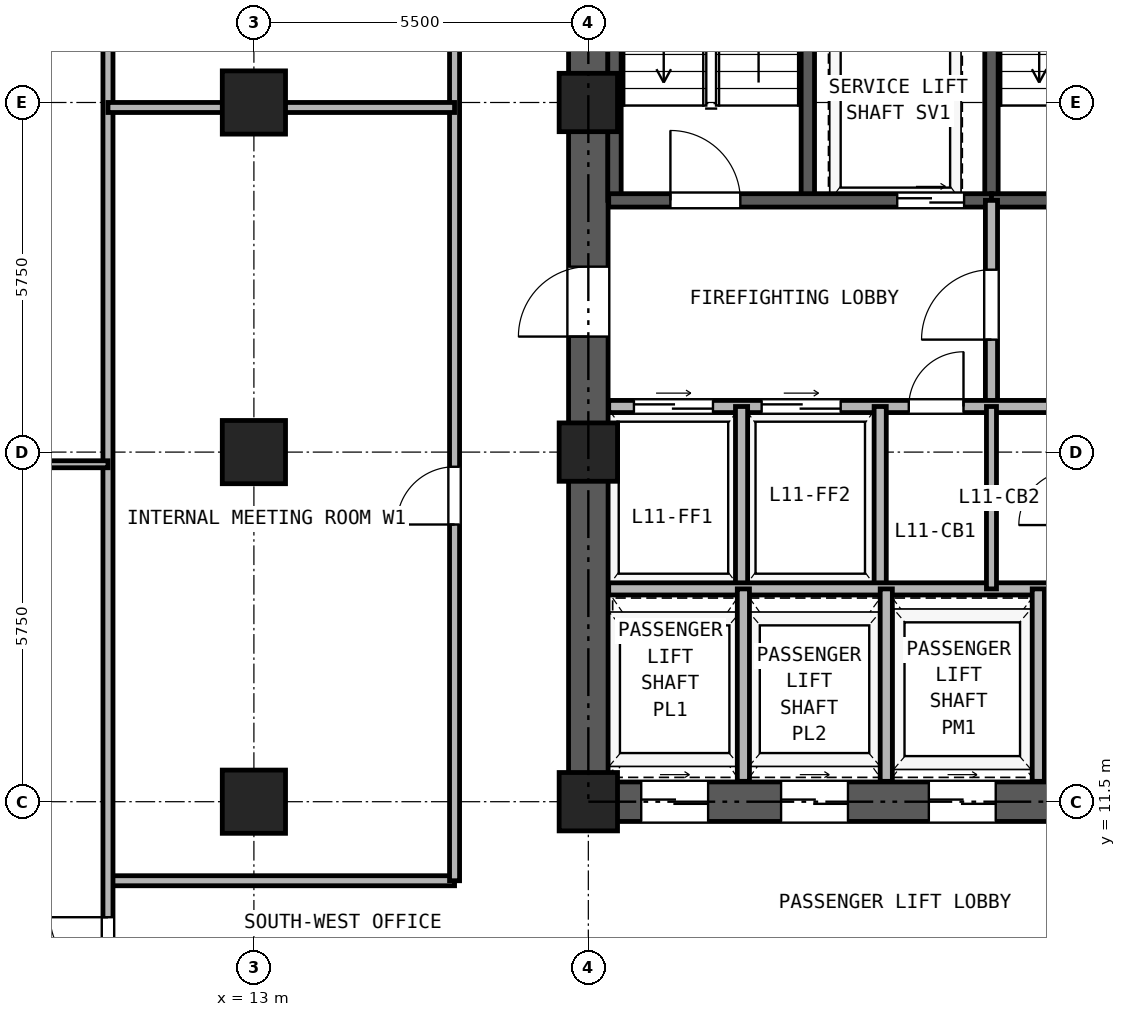
"""IFC4 building model, lengths in metres.
Left out: names, types, materials, properties, quantities, classifications, styles, units other than length and angle.
Written with IfcOpenShell. Run it as: python <this file> out.ifc"""

import sys

from ifc_helpers import new_model, si_unit, direction, frame, frame_2d, origin, origin_2d, place, context, subcontext, project, spatial, rectangle, hollow_rectangle, extrude, source, transform, mapped, element, fill, save


model = new_model("IFC4")
c1 = context("Model", 3, precision=1e-05, world=origin(), true_north=direction((0.0, 1.0)))
c2 = subcontext(c1, "Body", "Model", "MODEL_VIEW")
j1 = project(units=[si_unit("LENGTHUNIT", "METRE"), si_unit("PLANEANGLEUNIT", "RADIAN")], contexts=[c1])
p1 = place(None, origin())
s1 = spatial("IfcSite", under=j1, at=p1, CompositionType="ELEMENT")
p2 = place(p1, origin())
s2 = spatial("IfcBuilding", under=s1, at=p2, CompositionType="ELEMENT")
p3 = place(p2, frame((0.0, 0.0, 44.1)))
s3 = spatial("IfcBuildingStorey", under=s2, at=p3, CompositionType="ELEMENT", Elevation=44.1)
m1 = source(origin(), c2, "Body", "SweptSolid", [
    extrude(hollow_rectangle(XDim=1.04, YDim=1.04, WallThickness=0.065, at=origin_2d()), origin(), (0.0, 0.0, 1.0), 3.32),
])
for number, where, z_axis, x_axis in (
    (1, (13.0, 11.5, 0.0), (0.0, 0.0, 1.0), (1.0, 0.0, 0.0)),
    (2, (13.0, 17.25, 0.0), (0.0, 0.0, 1.0), (1.0, 0.0, 0.0)),
    (3, (13.0, 23.0, 0.0), (0.0, 0.0, 1.0), (1.0, 0.0, 0.0)),
):
    element("IfcColumn", number, at=place(p3, frame(where, z_axis=z_axis, x_axis=x_axis)), inside=s3, PredefinedType="COLUMN", context=c2, shape_type="MappedRepresentation", body=[
        mapped(m1, transform((0.0, 0.0, 0.0), x_axis=(1.0, 0.0, 0.0), y_axis=(0.0, 1.0, 0.0), z_axis=(0.0, 0.0, 1.0), scale=1.0)),
    ])
m2 = source(origin(), c2, "Body", "SweptSolid", [
    extrude(hollow_rectangle(XDim=0.96, YDim=0.96, WallThickness=0.06, at=origin_2d()), origin(), (0.0, 0.0, 1.0), 3.32),
])
for number, where, z_axis, x_axis in (
    (4, (18.5, 11.5, 0.0), (0.0, 0.0, 1.0), (1.0, 0.0, 0.0)),
    (5, (18.5, 17.25, 0.0), (0.0, 0.0, 1.0), (1.0, 0.0, 0.0)),
    (6, (18.5, 23.0, 0.0), (0.0, 0.0, 1.0), (1.0, 0.0, 0.0)),
):
    element("IfcColumn", number, at=place(p3, frame(where, z_axis=z_axis, x_axis=x_axis)), inside=s3, PredefinedType="COLUMN", context=c2, shape_type="MappedRepresentation", body=[
        mapped(m2, transform((0.0, 0.0, 0.0), x_axis=(1.0, 0.0, 0.0), y_axis=(0.0, 1.0, 0.0), z_axis=(0.0, 0.0, 1.0), scale=1.0)),
    ])
p4 = place(p3, frame((18.175, 11.5, 0.0), z_axis=(0.0, 0.0, 1.0), x_axis=(1.0, 0.0, 0.0)))
e7 = element("IfcWall", 7, at=p4, inside=s3, PredefinedType="SHEAR", context=c2, shape_type="SweptSolid", body=[
    extrude(rectangle(XDim=10.65, YDim=0.65, at=frame_2d((5.325, 0.0))), origin(), (0.0, 0.0, 1.0), 3.32),
])
p5 = place(p4, frame((1.195, 0.0, 0.0)))
e8 = element("IfcOpeningElement", 8, at=p5, cuts=e7, PredefinedType="OPENING", context=c2, shape_type="SweptSolid", body=[
    extrude(rectangle(XDim=1.1, YDim=2.25, at=frame_2d((0.55, 1.125))), frame((0.0, 0.335, 0.0), z_axis=(0.0, -1.0, 0.0), x_axis=(1.0, 0.0, 0.0)), (0.0, 0.0, 1.0), 0.67),
])
p6 = place(p4, frame((3.495, 0.0, 0.0)))
e9 = element("IfcOpeningElement", 9, at=p6, cuts=e7, PredefinedType="OPENING", context=c2, shape_type="SweptSolid", body=[
    extrude(rectangle(XDim=1.1, YDim=2.25, at=frame_2d((0.55, 1.125))), frame((0.0, 0.335, 0.0), z_axis=(0.0, -1.0, 0.0), x_axis=(1.0, 0.0, 0.0)), (0.0, 0.0, 1.0), 0.67),
])
p7 = place(p4, frame((5.925, 0.0, 0.0)))
e10 = element("IfcOpeningElement", 10, at=p7, cuts=e7, PredefinedType="OPENING", context=c2, shape_type="SweptSolid", body=[
    extrude(rectangle(XDim=1.1, YDim=2.25, at=frame_2d((0.55, 1.125))), frame((0.0, 0.335, 0.0), z_axis=(0.0, -1.0, 0.0), x_axis=(1.0, 0.0, 0.0)), (0.0, 0.0, 1.0), 0.67),
])
p8 = place(p4, frame((8.325, 0.0, 0.0)))
e11 = element("IfcOpeningElement", 11, at=p8, cuts=e7, PredefinedType="OPENING", context=c2, shape_type="SweptSolid", body=[
    extrude(rectangle(XDim=1.1, YDim=2.25, at=frame_2d((0.55, 1.125))), frame((0.0, 0.335, 0.0), z_axis=(0.0, -1.0, 0.0), x_axis=(1.0, 0.0, 0.0)), (0.0, 0.0, 1.0), 0.67),
])
p9 = place(p3, frame((18.5, 11.825, 0.0), z_axis=(0.0, 0.0, 1.0), x_axis=(0.0, 1.0, 0.0)))
e12 = element("IfcWall", 12, at=p9, inside=s3, PredefinedType="SHEAR", context=c2, shape_type="SweptSolid", body=[
    extrude(rectangle(XDim=16.6, YDim=0.65, at=frame_2d((8.3, 0.0))), origin(), (0.0, 0.0, 1.0), 3.32),
])
p10 = place(p9, frame((7.325, 0.0, 0.0)))
e13 = element("IfcOpeningElement", 13, at=p10, cuts=e12, PredefinedType="OPENING", context=c2, shape_type="SweptSolid", body=[
    extrude(rectangle(XDim=1.15, YDim=2.2, at=frame_2d((0.575, 1.1))), frame((0.0, 0.335, 0.0), z_axis=(0.0, -1.0, 0.0), x_axis=(1.0, 0.0, 0.0)), (0.0, 0.0, 1.0), 0.67),
])
for number, where, z_axis, x_axis in (
    (14, (18.93, 21.39, 0.0), (0.0, 0.0, 1.0), (0.0, 1.0, 0.0)),
    (15, (22.11, 21.39, 0.0), (0.0, 0.0, 1.0), (0.0, 1.0, 0.0)),
    (16, (25.13, 21.39, 0.0), (0.0, 0.0, 1.0), (0.0, 1.0, 0.0)),
):
    element("IfcWall", number, at=place(p3, frame(where, z_axis=z_axis, x_axis=x_axis)), inside=s3, PredefinedType="SOLIDWALL", context=c2, shape_type="SweptSolid", body=[
        extrude(rectangle(XDim=7.11, YDim=0.22, at=frame_2d((3.555, 0.0))), origin(), (0.0, 0.0, 1.0), 3.32),
    ])
p11 = place(p3, frame((18.835, 21.39, 0.0), z_axis=(0.0, 0.0, 1.0), x_axis=(1.0, 0.0, 0.0)))
e17 = element("IfcWall", 17, at=p11, inside=s3, PredefinedType="SOLIDWALL", context=c2, shape_type="SweptSolid", body=[
    extrude(rectangle(XDim=6.295, YDim=0.22, at=frame_2d((3.147, 0.0))), origin(), (0.0, 0.0, 1.0), 3.32),
])
p12 = place(p11, frame((1.015, 0.0, 0.0)))
e18 = element("IfcOpeningElement", 18, at=p12, cuts=e17, PredefinedType="OPENING", context=c2, shape_type="SweptSolid", body=[
    extrude(rectangle(XDim=1.15, YDim=2.2, at=frame_2d((0.575, 1.1))), frame((0.0, 0.12, 0.0), z_axis=(0.0, -1.0, 0.0), x_axis=(1.0, 0.0, 0.0)), (0.0, 0.0, 1.0), 0.24),
])
p13 = place(p11, frame((4.745, 0.0, 0.0)))
e19 = element("IfcOpeningElement", 19, at=p13, cuts=e17, PredefinedType="OPENING", context=c2, shape_type="SweptSolid", body=[
    extrude(rectangle(XDim=1.1, YDim=2.25, at=frame_2d((0.55, 1.125))), frame((0.0, 0.12, 0.0), z_axis=(0.0, -1.0, 0.0), x_axis=(1.0, 0.0, 0.0)), (0.0, 0.0, 1.0), 0.24),
])
p14 = place(p3, frame((25.13, 21.39, 0.0), z_axis=(0.0, 0.0, 1.0), x_axis=(1.0, 0.0, 0.0)))
e20 = element("IfcWall", 20, at=p14, inside=s3, PredefinedType="SOLIDWALL", context=c2, shape_type="SweptSolid", body=[
    extrude(rectangle(XDim=3.035, YDim=0.22, at=frame_2d((1.518, 0.0))), origin(), (0.0, 0.0, 1.0), 3.32),
])
p15 = place(p14, frame((0.92, 0.0, 0.0)))
e21 = element("IfcOpeningElement", 21, at=p15, cuts=e20, PredefinedType="OPENING", context=c2, shape_type="SweptSolid", body=[
    extrude(rectangle(XDim=1.15, YDim=2.2, at=frame_2d((0.575, 1.1))), frame((0.0, 0.12, 0.0), z_axis=(0.0, -1.0, 0.0), x_axis=(1.0, 0.0, 0.0)), (0.0, 0.0, 1.0), 0.24),
])
p16 = place(p3, frame((25.13, 18.0, 0.0), z_axis=(0.0, 0.0, 1.0), x_axis=(0.0, 1.0, 0.0)))
e22 = element("IfcWall", 22, at=p16, inside=s3, PredefinedType="PARTITIONING", context=c2, shape_type="SweptSolid", body=[
    extrude(rectangle(XDim=3.39, YDim=0.2, at=frame_2d((1.695, 0.0))), origin(), (0.0, 0.0, 1.0), 3.32),
])
p17 = place(p16, frame((1.1, 0.0, 0.0)))
e23 = element("IfcOpeningElement", 23, at=p17, cuts=e22, PredefinedType="OPENING", context=c2, shape_type="SweptSolid", body=[
    extrude(rectangle(XDim=1.15, YDim=2.2, at=frame_2d((0.575, 1.1))), frame((0.0, 0.11, 0.0), z_axis=(0.0, -1.0, 0.0), x_axis=(1.0, 0.0, 0.0)), (0.0, 0.0, 1.0), 0.22),
])
p18 = place(p3, frame((18.835, 18.0, 0.0), z_axis=(0.0, 0.0, 1.0), x_axis=(1.0, 0.0, 0.0)))
e24 = element("IfcWall", 24, at=p18, inside=s3, PredefinedType="PARTITIONING", context=c2, shape_type="SweptSolid", body=[
    extrude(rectangle(XDim=9.33, YDim=0.2, at=frame_2d((4.665, 0.0))), origin(), (0.0, 0.0, 1.0), 3.32),
])
p19 = place(p18, frame((0.415, 0.0, 0.0)))
e25 = element("IfcOpeningElement", 25, at=p19, cuts=e24, PredefinedType="OPENING", context=c2, shape_type="SweptSolid", body=[
    extrude(rectangle(XDim=1.3, YDim=2.3, at=frame_2d((0.65, 1.15))), frame((0.0, 0.11, 0.0), z_axis=(0.0, -1.0, 0.0), x_axis=(1.0, 0.0, 0.0)), (0.0, 0.0, 1.0), 0.22),
])
p20 = place(p18, frame((2.515, 0.0, 0.0)))
e26 = element("IfcOpeningElement", 26, at=p20, cuts=e24, PredefinedType="OPENING", context=c2, shape_type="SweptSolid", body=[
    extrude(rectangle(XDim=1.3, YDim=2.3, at=frame_2d((0.65, 1.15))), frame((0.0, 0.11, 0.0), z_axis=(0.0, -1.0, 0.0), x_axis=(1.0, 0.0, 0.0)), (0.0, 0.0, 1.0), 0.22),
])
p21 = place(p18, frame((4.935, 0.0, 0.0)))
e27 = element("IfcOpeningElement", 27, at=p21, cuts=e24, PredefinedType="OPENING", context=c2, shape_type="SweptSolid", body=[
    extrude(rectangle(XDim=0.9, YDim=2.05, at=frame_2d((0.45, 1.025))), frame((0.0, 0.11, 0.0), z_axis=(0.0, -1.0, 0.0), x_axis=(1.0, 0.0, 0.0)), (0.0, 0.0, 1.0), 0.22),
])
p22 = place(p18, frame((8.065, 0.0, 0.0)))
e28 = element("IfcOpeningElement", 28, at=p22, cuts=e24, PredefinedType="OPENING", context=c2, shape_type="SweptSolid", body=[
    extrude(rectangle(XDim=0.9, YDim=2.05, at=frame_2d((0.45, 1.025))), frame((0.0, 0.11, 0.0), z_axis=(0.0, -1.0, 0.0), x_axis=(1.0, 0.0, 0.0)), (0.0, 0.0, 1.0), 0.22),
])
for number, where, z_axis, x_axis in (
    (29, (21.02, 15.0, 0.0), (0.0, 0.0, 1.0), (0.0, 1.0, 0.0)),
    (30, (23.3, 15.0, 0.0), (0.0, 0.0, 1.0), (0.0, 1.0, 0.0)),
):
    element("IfcWall", number, at=place(p3, frame(where, z_axis=z_axis, x_axis=x_axis)), inside=s3, PredefinedType="PARTITIONING", context=c2, shape_type="SweptSolid", body=[
        extrude(rectangle(XDim=3.0, YDim=0.2, at=frame_2d((1.5, 0.0))), origin(), (0.0, 0.0, 1.0), 3.32),
    ])
p23 = place(p3, frame((18.835, 15.0, 0.0), z_axis=(0.0, 0.0, 1.0), x_axis=(1.0, 0.0, 0.0)))
e31 = element("IfcWall", 31, at=p23, inside=s3, PredefinedType="PARTITIONING", context=c2, shape_type="SweptSolid", body=[
    extrude(rectangle(XDim=9.33, YDim=0.2, at=frame_2d((4.665, 0.0))), origin(), (0.0, 0.0, 1.0), 3.32),
])
p24 = place(p3, frame((25.13, 15.0, 0.0), z_axis=(0.0, 0.0, 1.0), x_axis=(0.0, 1.0, 0.0)))
e32 = element("IfcWall", 32, at=p24, inside=s3, PredefinedType="PARTITIONING", context=c2, shape_type="SweptSolid", body=[
    extrude(rectangle(XDim=3.0, YDim=0.165, at=frame_2d((1.5, 0.0))), origin(), (0.0, 0.0, 1.0), 3.32),
])
for number, where, z_axis, x_axis in (
    (33, (21.05, 11.835, 0.0), (0.0, 0.0, 1.0), (0.0, 1.0, 0.0)),
    (34, (23.4, 11.835, 0.0), (0.0, 0.0, 1.0), (0.0, 1.0, 0.0)),
    (35, (25.9, 11.835, 0.0), (0.0, 0.0, 1.0), (0.0, 1.0, 0.0)),
):
    element("IfcWall", number, at=place(p3, frame(where, z_axis=z_axis, x_axis=x_axis)), inside=s3, PredefinedType="PARTITIONING", context=c2, shape_type="SweptSolid", body=[
        extrude(rectangle(XDim=3.165, YDim=0.2, at=frame_2d((1.583, 0.0))), origin(), (0.0, 0.0, 1.0), 3.32),
    ])
p25 = place(p3, frame((10.6, 10.2, 0.0), z_axis=(0.0, 0.0, 1.0), x_axis=(1.0, 0.0, 0.0)))
e36 = element("IfcWall", 36, at=p25, inside=s3, PredefinedType="PARTITIONING", context=c2, shape_type="SweptSolid", body=[
    extrude(rectangle(XDim=5.7, YDim=0.165, at=frame_2d((2.85, 0.0))), origin(), (0.0, 0.0, 1.0), 3.32),
])
p26 = place(p3, frame((16.3, 10.2, 0.0), z_axis=(0.0, 0.0, 1.0), x_axis=(0.0, 1.0, 0.0)))
e37 = element("IfcWall", 37, at=p26, inside=s3, PredefinedType="PARTITIONING", context=c2, shape_type="SweptSolid", body=[
    extrude(rectangle(XDim=19.7, YDim=0.165, at=frame_2d((9.85, 0.0))), origin(), (0.0, 0.0, 1.0), 3.32),
])
p27 = place(p26, frame((5.859, 0.0, 0.0)))
e38 = element("IfcOpeningElement", 38, at=p27, cuts=e37, PredefinedType="OPENING", context=c2, shape_type="SweptSolid", body=[
    extrude(rectangle(XDim=0.95, YDim=2.15, at=frame_2d((0.475, 1.075))), frame((0.0, 0.093, 0.0), z_axis=(0.0, -1.0, 0.0), x_axis=(1.0, 0.0, 0.0)), (0.0, 0.0, 1.0), 0.185),
])
p28 = place(p26, frame((15.709, 0.0, 0.0)))
e39 = element("IfcOpeningElement", 39, at=p28, cuts=e37, PredefinedType="OPENING", context=c2, shape_type="SweptSolid", body=[
    extrude(rectangle(XDim=0.95, YDim=2.15, at=frame_2d((0.475, 1.075))), frame((0.0, 0.093, 0.0), z_axis=(0.0, -1.0, 0.0), x_axis=(1.0, 0.0, 0.0)), (0.0, 0.0, 1.0), 0.185),
])
p29 = place(p3, frame((10.6, 0.16, 0.0), z_axis=(0.0, 0.0, 1.0), x_axis=(0.0, 1.0, 0.0)))
e40 = element("IfcWall", 40, at=p29, inside=s3, PredefinedType="PARTITIONING", context=c2, shape_type="SweptSolid", body=[
    extrude(rectangle(XDim=40.18, YDim=0.165, at=frame_2d((20.09, 0.0))), origin(), (0.0, 0.0, 1.0), 3.32),
])
p30 = place(p29, frame((8.49, 0.0, 0.0)))
e41 = element("IfcOpeningElement", 41, at=p30, cuts=e40, PredefinedType="OPENING", context=c2, shape_type="SweptSolid", body=[
    extrude(rectangle(XDim=0.95, YDim=2.15, at=frame_2d((0.475, 1.075))), frame((0.0, 0.093, 0.0), z_axis=(0.0, -1.0, 0.0), x_axis=(1.0, 0.0, 0.0)), (0.0, 0.0, 1.0), 0.185),
])
p31 = place(p29, frame((30.29, 0.0, 0.0)))
e42 = element("IfcOpeningElement", 42, at=p31, cuts=e40, PredefinedType="OPENING", context=c2, shape_type="SweptSolid", body=[
    extrude(rectangle(XDim=0.95, YDim=2.15, at=frame_2d((0.475, 1.075))), frame((0.0, 0.093, 0.0), z_axis=(0.0, -1.0, 0.0), x_axis=(1.0, 0.0, 0.0)), (0.0, 0.0, 1.0), 0.185),
])
p32 = place(p3, frame((0.16, 17.05, 0.0), z_axis=(0.0, 0.0, 1.0), x_axis=(1.0, 0.0, 0.0)))
e43 = element("IfcWall", 43, at=p32, inside=s3, PredefinedType="PARTITIONING", context=c2, shape_type="SweptSolid", body=[
    extrude(rectangle(XDim=10.44, YDim=0.115, at=frame_2d((5.22, 0.0))), origin(), (0.0, 0.0, 1.0), 2.539),
])
p33 = place(p3, frame((10.6, 22.918, 0.0), z_axis=(0.0, 0.0, 1.0), x_axis=(1.0, 0.0, 0.0)))
e44 = element("IfcWall", 44, at=p33, inside=s3, PredefinedType="PARTITIONING", context=c2, shape_type="SweptSolid", body=[
    extrude(rectangle(XDim=5.7, YDim=0.165, at=frame_2d((2.85, 0.0))), origin(), (0.0, 0.0, 1.0), 2.539),
])
p34 = place(p12, frame((1.15, 0.0, 0.0), z_axis=(0.0, 0.0, 1.0), x_axis=(-1.0, 0.0, 0.0)))
e45 = element("IfcDoor", 45, at=p34, inside=s3, OperationType="SINGLE_SWING_LEFT", PredefinedType="DOOR", context=c2, shape_type="SweptSolid", body=[
    extrude(rectangle(XDim=1.15, YDim=2.2, at=frame_2d((0.575, 1.1))), frame((0.0, 0.025, 0.0), z_axis=(0.0, -1.0, 0.0), x_axis=(1.0, 0.0, 0.0)), (0.0, 0.0, 1.0), 0.05),
])
fill(e18, e45)
p35 = place(p13, frame((1.1, 0.0, 0.0), z_axis=(0.0, 0.0, 1.0), x_axis=(-1.0, 0.0, 0.0)))
e46 = element("IfcDoor", 46, at=p35, inside=s3, OperationType="DOUBLE_DOOR_SLIDING", PredefinedType="DOOR", context=c2, shape_type="SweptSolid", body=[
    extrude(rectangle(XDim=1.1, YDim=2.25, at=frame_2d((0.55, 1.125))), frame((0.0, 0.025, 0.0), z_axis=(0.0, -1.0, 0.0), x_axis=(1.0, 0.0, 0.0)), (0.0, 0.0, 1.0), 0.05),
])
fill(e19, e46)
p36 = place(p17, origin())
e47 = element("IfcDoor", 47, at=p36, inside=s3, OperationType="SINGLE_SWING_LEFT", PredefinedType="DOOR", context=c2, shape_type="SweptSolid", body=[
    extrude(rectangle(XDim=1.15, YDim=2.2, at=frame_2d((0.575, 1.1))), frame((0.0, 0.025, 0.0), z_axis=(0.0, -1.0, 0.0), x_axis=(1.0, 0.0, 0.0)), (0.0, 0.0, 1.0), 0.05),
])
fill(e23, e47)
p37 = place(p19, origin())
e48 = element("IfcDoor", 48, at=p37, inside=s3, OperationType="DOUBLE_DOOR_SLIDING", PredefinedType="DOOR", context=c2, shape_type="SweptSolid", body=[
    extrude(rectangle(XDim=1.3, YDim=2.3, at=frame_2d((0.65, 1.15))), frame((0.0, 0.025, 0.0), z_axis=(0.0, -1.0, 0.0), x_axis=(1.0, 0.0, 0.0)), (0.0, 0.0, 1.0), 0.05),
])
fill(e25, e48)
p38 = place(p20, origin())
e49 = element("IfcDoor", 49, at=p38, inside=s3, OperationType="DOUBLE_DOOR_SLIDING", PredefinedType="DOOR", context=c2, shape_type="SweptSolid", body=[
    extrude(rectangle(XDim=1.3, YDim=2.3, at=frame_2d((0.65, 1.15))), frame((0.0, 0.025, 0.0), z_axis=(0.0, -1.0, 0.0), x_axis=(1.0, 0.0, 0.0)), (0.0, 0.0, 1.0), 0.05),
])
fill(e26, e49)
p39 = place(p21, frame((0.9, 0.0, 0.0), z_axis=(0.0, 0.0, 1.0), x_axis=(-1.0, 0.0, 0.0)))
e50 = element("IfcDoor", 50, at=p39, inside=s3, OperationType="SINGLE_SWING_RIGHT", PredefinedType="DOOR", context=c2, shape_type="SweptSolid", body=[
    extrude(rectangle(XDim=0.9, YDim=2.05, at=frame_2d((0.45, 1.025))), frame((0.0, 0.025, 0.0), z_axis=(0.0, -1.0, 0.0), x_axis=(1.0, 0.0, 0.0)), (0.0, 0.0, 1.0), 0.05),
])
fill(e27, e50)
p40 = place(p10, frame((1.15, 0.0, 0.0), z_axis=(0.0, 0.0, 1.0), x_axis=(-1.0, 0.0, 0.0)))
e51 = element("IfcDoor", 51, at=p40, inside=s3, OperationType="SINGLE_SWING_LEFT", PredefinedType="DOOR", context=c2, shape_type="SweptSolid", body=[
    extrude(rectangle(XDim=1.15, YDim=2.2, at=frame_2d((0.575, 1.1))), frame((0.0, 0.025, 0.0), z_axis=(0.0, -1.0, 0.0), x_axis=(1.0, 0.0, 0.0)), (0.0, 0.0, 1.0), 0.05),
])
fill(e13, e51)
p41 = place(p5, frame((1.1, 0.0, 0.0), z_axis=(0.0, 0.0, 1.0), x_axis=(-1.0, 0.0, 0.0)))
e52 = element("IfcDoor", 52, at=p41, inside=s3, OperationType="DOUBLE_DOOR_SLIDING", PredefinedType="DOOR", context=c2, shape_type="SweptSolid", body=[
    extrude(rectangle(XDim=1.1, YDim=2.25, at=frame_2d((0.55, 1.125))), frame((0.0, 0.025, 0.0), z_axis=(0.0, -1.0, 0.0), x_axis=(1.0, 0.0, 0.0)), (0.0, 0.0, 1.0), 0.05),
])
fill(e8, e52)
p42 = place(p6, frame((1.1, 0.0, 0.0), z_axis=(0.0, 0.0, 1.0), x_axis=(-1.0, 0.0, 0.0)))
e53 = element("IfcDoor", 53, at=p42, inside=s3, OperationType="DOUBLE_DOOR_SLIDING", PredefinedType="DOOR", context=c2, shape_type="SweptSolid", body=[
    extrude(rectangle(XDim=1.1, YDim=2.25, at=frame_2d((0.55, 1.125))), frame((0.0, 0.025, 0.0), z_axis=(0.0, -1.0, 0.0), x_axis=(1.0, 0.0, 0.0)), (0.0, 0.0, 1.0), 0.05),
])
fill(e9, e53)
p43 = place(p7, frame((1.1, 0.0, 0.0), z_axis=(0.0, 0.0, 1.0), x_axis=(-1.0, 0.0, 0.0)))
e54 = element("IfcDoor", 54, at=p43, inside=s3, OperationType="DOUBLE_DOOR_SLIDING", PredefinedType="DOOR", context=c2, shape_type="SweptSolid", body=[
    extrude(rectangle(XDim=1.1, YDim=2.25, at=frame_2d((0.55, 1.125))), frame((0.0, 0.025, 0.0), z_axis=(0.0, -1.0, 0.0), x_axis=(1.0, 0.0, 0.0)), (0.0, 0.0, 1.0), 0.05),
])
fill(e10, e54)
p44 = place(p30, frame((0.95, 0.0, 0.0), z_axis=(0.0, 0.0, 1.0), x_axis=(-1.0, 0.0, 0.0)))
e55 = element("IfcDoor", 55, at=p44, inside=s3, OperationType="SINGLE_SWING_RIGHT", PredefinedType="DOOR", context=c2, shape_type="SweptSolid", body=[
    extrude(rectangle(XDim=0.95, YDim=2.15, at=frame_2d((0.475, 1.075))), frame((0.0, 0.025, 0.0), z_axis=(0.0, -1.0, 0.0), x_axis=(1.0, 0.0, 0.0)), (0.0, 0.0, 1.0), 0.05),
])
fill(e41, e55)
p45 = place(p27, frame((0.95, 0.0, 0.0), z_axis=(0.0, 0.0, 1.0), x_axis=(-1.0, 0.0, 0.0)))
e56 = element("IfcDoor", 56, at=p45, inside=s3, OperationType="SINGLE_SWING_LEFT", PredefinedType="DOOR", context=c2, shape_type="SweptSolid", body=[
    extrude(rectangle(XDim=0.95, YDim=2.15, at=frame_2d((0.475, 1.075))), frame((0.0, 0.025, 0.0), z_axis=(0.0, -1.0, 0.0), x_axis=(1.0, 0.0, 0.0)), (0.0, 0.0, 1.0), 0.05),
])
fill(e38, e56)
save(model, sys.argv[1])
